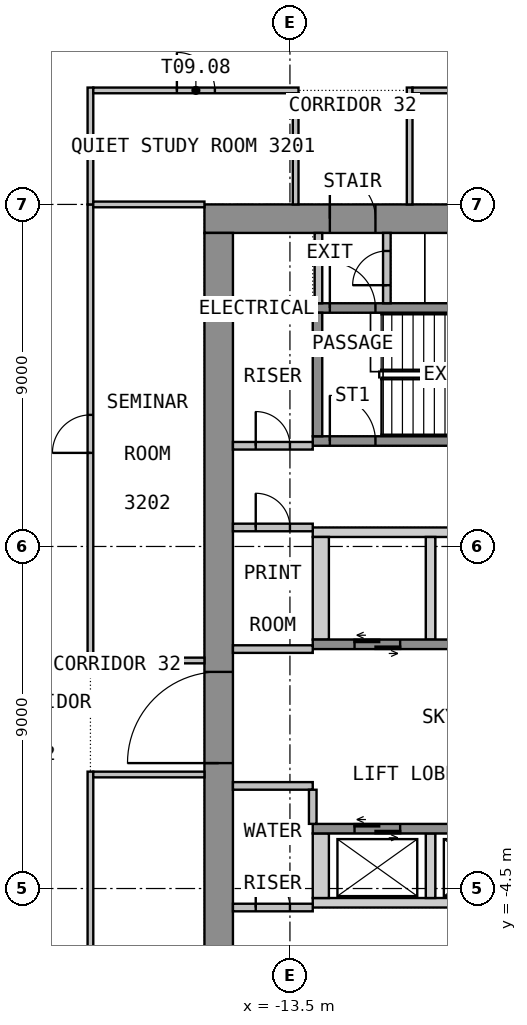
"""IFC4 building model, lengths in metres.
Left out: names, types, materials, properties, quantities, classifications, styles, units other than length and angle.
Written with IfcOpenShell. Run it as: python <this file> out.ifc"""

import sys

from ifc_helpers import new_model, si_unit, direction, frame, frame_2d, origin, place, context, subcontext, project, spatial, polyline, rectangle, outline, extrude, element, fill, save


model = new_model("IFC4")
c1 = context("Model", 3, precision=1e-05, world=origin(), true_north=direction((0.0, 1.0)))
c2 = subcontext(c1, "Body", "Model", "MODEL_VIEW")
j1 = project(units=[si_unit("LENGTHUNIT", "METRE"), si_unit("PLANEANGLEUNIT", "RADIAN")], contexts=[c1])
p1 = place(None, origin())
s1 = spatial("IfcSite", under=j1, at=p1, CompositionType="ELEMENT")
p2 = place(p1, origin())
s2 = spatial("IfcBuilding", under=s1, at=p2, CompositionType="ELEMENT")
p3 = place(p2, frame((0.0, 0.0, 132.6)))
s3 = spatial("IfcBuildingStorey", under=s2, at=p3, CompositionType="ELEMENT", Elevation=132.6)
p4 = place(p3, frame((-15.75, 13.125, 0.0), z_axis=(0.0, 0.0, 1.0), x_axis=(1.0, 0.0, 0.0)))
e1 = element("IfcWall", 1, at=p4, inside=s3, PredefinedType="SHEAR", context=c2, shape_type="SweptSolid", body=[
    extrude(rectangle(XDim=31.5, YDim=0.75, at=frame_2d((15.75, 0.0))), origin(), (0.0, 0.0, 1.0), 3.575),
])
p5 = place(p4, frame((14.55, 0.0, 0.0)))
e2 = element("IfcOpeningElement", 2, at=p5, cuts=e1, PredefinedType="OPENING", context=c2, shape_type="SweptSolid", body=[
    extrude(rectangle(XDim=2.4, YDim=2.1, at=frame_2d((1.2, 1.05))), frame((0.0, 0.385, 0.0), z_axis=(0.0, -1.0, 0.0), x_axis=(1.0, 0.0, 0.0)), (0.0, 0.0, 1.0), 0.77),
])
p6 = place(p4, frame((3.3, 0.0, 0.0)))
e3 = element("IfcOpeningElement", 3, at=p6, cuts=e1, PredefinedType="OPENING", context=c2, shape_type="SweptSolid", body=[
    extrude(rectangle(XDim=1.2, YDim=2.1, at=frame_2d((0.6, 1.05))), frame((0.0, 0.385, 0.0), z_axis=(0.0, -1.0, 0.0), x_axis=(1.0, 0.0, 0.0)), (0.0, 0.0, 1.0), 0.77),
])
p7 = place(p4, frame((27.0, 0.0, 0.0)))
e4 = element("IfcOpeningElement", 4, at=p7, cuts=e1, PredefinedType="OPENING", context=c2, shape_type="SweptSolid", body=[
    extrude(rectangle(XDim=1.2, YDim=2.1, at=frame_2d((0.6, 1.05))), frame((0.0, 0.385, 0.0), z_axis=(0.0, -1.0, 0.0), x_axis=(1.0, 0.0, 0.0)), (0.0, 0.0, 1.0), 0.77),
])
p8 = place(p3, frame((-15.375, -12.75, 0.0), z_axis=(0.0, 0.0, 1.0), x_axis=(0.0, 1.0, 0.0)))
e5 = element("IfcWall", 5, at=p8, inside=s3, PredefinedType="SHEAR", context=c2, shape_type="SweptSolid", body=[
    extrude(rectangle(XDim=25.5, YDim=0.75, at=frame_2d((12.75, 0.0))), origin(), (0.0, 0.0, 1.0), 3.575),
])
p9 = place(p8, frame((11.55, 0.0, 0.0)))
e6 = element("IfcOpeningElement", 6, at=p9, cuts=e5, PredefinedType="OPENING", context=c2, shape_type="SweptSolid", body=[
    extrude(rectangle(XDim=2.4, YDim=2.1, at=frame_2d((1.2, 1.05))), frame((0.0, 0.385, 0.0), z_axis=(0.0, -1.0, 0.0), x_axis=(1.0, 0.0, 0.0)), (0.0, 0.0, 1.0), 0.77),
])
p10 = place(p3, origin())
e7 = element("IfcWall", 7, at=p10, inside=s3, PredefinedType="SHEAR", context=c2, shape_type="SweptSolid", body=[
    extrude(outline(polyline([(-12.9, 4.75), (-4.075, 4.75), (-4.075, 5.0), (-12.9, 5.0), (-12.9, 4.75)])), origin(), (0.0, 0.0, 1.0), 3.575),
])
p11 = place(p3, origin())
e8 = element("IfcWall", 8, at=p11, inside=s3, PredefinedType="SHEAR", context=c2, shape_type="SweptSolid", body=[
    extrude(outline(polyline([(-12.9, 2.05), (-12.475, 2.05), (-12.475, 4.75), (-12.9, 4.75), (-12.9, 2.05)])), origin(), (0.0, 0.0, 1.0), 3.575),
])
p12 = place(p3, origin())
e9 = element("IfcWall", 9, at=p12, inside=s3, PredefinedType="SHEAR", context=c2, shape_type="SweptSolid", body=[
    extrude(outline(polyline([(-9.925, 2.05), (-9.675, 2.05), (-9.675, 4.75), (-9.925, 4.75), (-9.925, 2.05)])), origin(), (0.0, 0.0, 1.0), 3.575),
])
p13 = place(p3, frame((-12.9, 1.925, 0.0), z_axis=(0.0, 0.0, 1.0), x_axis=(1.0, 0.0, 0.0)))
e10 = element("IfcWall", 10, at=p13, inside=s3, PredefinedType="SHEAR", context=c2, shape_type="SweptSolid", body=[
    extrude(rectangle(XDim=8.825, YDim=0.25, at=frame_2d((4.413, 0.0))), origin(), (0.0, 0.0, 1.0), 3.575),
])
p14 = place(p13, frame((1.1, 0.0, 0.0)))
e11 = element("IfcOpeningElement", 11, at=p14, cuts=e10, PredefinedType="OPENING", context=c2, shape_type="SweptSolid", body=[
    extrude(rectangle(XDim=1.2, YDim=2.1, at=frame_2d((0.6, 1.05))), frame((0.0, 0.135, 0.0), z_axis=(0.0, -1.0, 0.0), x_axis=(1.0, 0.0, 0.0)), (0.0, 0.0, 1.0), 0.27),
])
p15 = place(p13, frame((3.9, 0.0, 0.0)))
e12 = element("IfcOpeningElement", 12, at=p15, cuts=e10, PredefinedType="OPENING", context=c2, shape_type="SweptSolid", body=[
    extrude(rectangle(XDim=1.2, YDim=2.1, at=frame_2d((0.6, 1.05))), frame((0.0, 0.135, 0.0), z_axis=(0.0, -1.0, 0.0), x_axis=(1.0, 0.0, 0.0)), (0.0, 0.0, 1.0), 0.27),
])
p16 = place(p13, frame((6.7, 0.0, 0.0)))
e13 = element("IfcOpeningElement", 13, at=p16, cuts=e10, PredefinedType="OPENING", context=c2, shape_type="SweptSolid", body=[
    extrude(rectangle(XDim=1.2, YDim=2.1, at=frame_2d((0.6, 1.05))), frame((0.0, 0.135, 0.0), z_axis=(0.0, -1.0, 0.0), x_axis=(1.0, 0.0, 0.0)), (0.0, 0.0, 1.0), 0.27),
])
p17 = place(p3, origin())
e14 = element("IfcWall", 14, at=p17, inside=s3, PredefinedType="SHEAR", context=c2, shape_type="SweptSolid", body=[
    extrude(outline(polyline([(-12.9, -5.0), (-4.075, -5.0), (-4.075, -4.75), (-12.9, -4.75), (-12.9, -5.0)])), origin(), (0.0, 0.0, 1.0), 3.575),
])
p18 = place(p3, origin())
e15 = element("IfcWall", 15, at=p18, inside=s3, PredefinedType="SHEAR", context=c2, shape_type="SweptSolid", body=[
    extrude(outline(polyline([(-12.9, -4.75), (-12.475, -4.75), (-12.475, -3.05), (-12.9, -3.05), (-12.9, -4.75)])), origin(), (0.0, 0.0, 1.0), 3.575),
])
p19 = place(p3, origin())
e16 = element("IfcWall", 16, at=p19, inside=s3, PredefinedType="SHEAR", context=c2, shape_type="SweptSolid", body=[
    extrude(outline(polyline([(-9.925, -4.75), (-9.675, -4.75), (-9.675, -3.05), (-9.925, -3.05), (-9.925, -4.75)])), origin(), (0.0, 0.0, 1.0), 3.575),
])
p20 = place(p3, frame((-12.9, -2.925, 0.0), z_axis=(0.0, 0.0, 1.0), x_axis=(1.0, 0.0, 0.0)))
e17 = element("IfcWall", 17, at=p20, inside=s3, PredefinedType="SHEAR", context=c2, shape_type="SweptSolid", body=[
    extrude(rectangle(XDim=8.825, YDim=0.25, at=frame_2d((4.413, 0.0))), origin(), (0.0, 0.0, 1.0), 3.575),
])
p21 = place(p20, frame((1.1, 0.0, 0.0)))
e18 = element("IfcOpeningElement", 18, at=p21, cuts=e17, PredefinedType="OPENING", context=c2, shape_type="SweptSolid", body=[
    extrude(rectangle(XDim=1.2, YDim=2.1, at=frame_2d((0.6, 1.05))), frame((0.0, 0.135, 0.0), z_axis=(0.0, -1.0, 0.0), x_axis=(1.0, 0.0, 0.0)), (0.0, 0.0, 1.0), 0.27),
])
p22 = place(p20, frame((3.9, 0.0, 0.0)))
e19 = element("IfcOpeningElement", 19, at=p22, cuts=e17, PredefinedType="OPENING", context=c2, shape_type="SweptSolid", body=[
    extrude(rectangle(XDim=1.2, YDim=2.1, at=frame_2d((0.6, 1.05))), frame((0.0, 0.135, 0.0), z_axis=(0.0, -1.0, 0.0), x_axis=(1.0, 0.0, 0.0)), (0.0, 0.0, 1.0), 0.27),
])
p23 = place(p20, frame((6.7, 0.0, 0.0)))
e20 = element("IfcOpeningElement", 20, at=p23, cuts=e17, PredefinedType="OPENING", context=c2, shape_type="SweptSolid", body=[
    extrude(rectangle(XDim=1.2, YDim=2.1, at=frame_2d((0.6, 1.05))), frame((0.0, 0.135, 0.0), z_axis=(0.0, -1.0, 0.0), x_axis=(1.0, 0.0, 0.0)), (0.0, 0.0, 1.0), 0.27),
])
p24 = place(p3, frame((-12.9, 7.275, 0.0), z_axis=(0.0, 0.0, 1.0), x_axis=(1.0, 0.0, 0.0)))
e21 = element("IfcWall", 21, at=p24, inside=s3, PredefinedType="SHEAR", context=c2, shape_type="SweptSolid", body=[
    extrude(rectangle(XDim=10.1, YDim=0.25, at=frame_2d((5.05, 0.0))), origin(), (0.0, 0.0, 1.0), 3.575),
])
p25 = place(p24, frame((0.45, 0.0, 0.0)))
e22 = element("IfcOpeningElement", 22, at=p25, cuts=e21, PredefinedType="OPENING", context=c2, shape_type="SweptSolid", body=[
    extrude(rectangle(XDim=1.2, YDim=2.1, at=frame_2d((0.6, 1.05))), frame((0.0, 0.135, 0.0), z_axis=(0.0, -1.0, 0.0), x_axis=(1.0, 0.0, 0.0)), (0.0, 0.0, 1.0), 0.27),
])
p26 = place(p3, frame((-12.9, 10.775, 0.0), z_axis=(0.0, 0.0, 1.0), x_axis=(1.0, 0.0, 0.0)))
e23 = element("IfcWall", 23, at=p26, inside=s3, PredefinedType="SHEAR", context=c2, shape_type="SweptSolid", body=[
    extrude(rectangle(XDim=10.1, YDim=0.25, at=frame_2d((5.05, 0.0))), origin(), (0.0, 0.0, 1.0), 3.575),
])
p27 = place(p26, frame((0.45, 0.0, 0.0)))
e24 = element("IfcOpeningElement", 24, at=p27, cuts=e23, PredefinedType="OPENING", context=c2, shape_type="SweptSolid", body=[
    extrude(rectangle(XDim=1.2, YDim=2.1, at=frame_2d((0.6, 1.05))), frame((0.0, 0.135, 0.0), z_axis=(0.0, -1.0, 0.0), x_axis=(1.0, 0.0, 0.0)), (0.0, 0.0, 1.0), 0.27),
])
p28 = place(p3, frame((-12.775, 7.4, 0.0), z_axis=(0.0, 0.0, 1.0), x_axis=(0.0, 1.0, 0.0)))
e25 = element("IfcWall", 25, at=p28, inside=s3, PredefinedType="SHEAR", context=c2, shape_type="SweptSolid", body=[
    extrude(rectangle(XDim=3.25, YDim=0.25, at=frame_2d((1.625, 0.0))), origin(), (0.0, 0.0, 1.0), 3.575),
])
p29 = place(p3, frame((-12.75, 10.9, 0.0), z_axis=(0.0, 0.0, 1.0), x_axis=(0.0, 1.0, 0.0)))
e26 = element("IfcWall", 26, at=p29, inside=s3, PredefinedType="PARTITIONING", context=c2, shape_type="SweptSolid", body=[
    extrude(rectangle(XDim=1.85, YDim=0.2, at=frame_2d((0.925, 0.0))), origin(), (0.0, 0.0, 1.0), 3.575),
])
p30 = place(p3, frame((-10.95, 10.9, 0.0), z_axis=(0.0, 0.0, 1.0), x_axis=(0.0, 1.0, 0.0)))
e27 = element("IfcWall", 27, at=p30, inside=s3, PredefinedType="PARTITIONING", context=c2, shape_type="SweptSolid", body=[
    extrude(rectangle(XDim=1.85, YDim=0.2, at=frame_2d((0.925, 0.0))), origin(), (0.0, 0.0, 1.0), 3.575),
])
p31 = place(p30, frame((0.475, 0.0, 0.0)))
e28 = element("IfcOpeningElement", 28, at=p31, cuts=e27, PredefinedType="OPENING", context=c2, shape_type="SweptSolid", body=[
    extrude(rectangle(XDim=0.9, YDim=2.1, at=frame_2d((0.45, 1.05))), frame((0.0, 0.11, 0.0), z_axis=(0.0, -1.0, 0.0), x_axis=(1.0, 0.0, 0.0)), (0.0, 0.0, 1.0), 0.22),
])
p32 = place(p3, frame((-15.0, 7.15, 0.0), z_axis=(0.0, 0.0, 1.0), x_axis=(1.0, 0.0, 0.0)))
e29 = element("IfcWall", 29, at=p32, inside=s3, PredefinedType="PARTITIONING", context=c2, shape_type="SweptSolid", body=[
    extrude(rectangle(XDim=2.1, YDim=0.2, at=frame_2d((1.05, 0.0))), origin(), (0.0, 0.0, 1.0), 3.575),
])
p33 = place(p32, frame((0.6, 0.0, 0.0)))
e30 = element("IfcOpeningElement", 30, at=p33, cuts=e29, PredefinedType="OPENING", context=c2, shape_type="SweptSolid", body=[
    extrude(rectangle(XDim=0.9, YDim=2.1, at=frame_2d((0.45, 1.05))), frame((0.0, 0.11, 0.0), z_axis=(0.0, -1.0, 0.0), x_axis=(1.0, 0.0, 0.0)), (0.0, 0.0, 1.0), 0.22),
])
p34 = place(p3, frame((-15.0, 5.0, 0.0), z_axis=(0.0, 0.0, 1.0), x_axis=(1.0, 0.0, 0.0)))
e31 = element("IfcWall", 31, at=p34, inside=s3, PredefinedType="PARTITIONING", context=c2, shape_type="SweptSolid", body=[
    extrude(rectangle(XDim=2.1, YDim=0.2, at=frame_2d((1.05, 0.0))), origin(), (0.0, 0.0, 1.0), 3.575),
])
p35 = place(p34, frame((0.6, 0.0, 0.0)))
e32 = element("IfcOpeningElement", 32, at=p35, cuts=e31, PredefinedType="OPENING", context=c2, shape_type="SweptSolid", body=[
    extrude(rectangle(XDim=0.9, YDim=2.1, at=frame_2d((0.45, 1.05))), frame((0.0, 0.11, 0.0), z_axis=(0.0, -1.0, 0.0), x_axis=(1.0, 0.0, 0.0)), (0.0, 0.0, 1.0), 0.22),
])
p36 = place(p3, frame((-15.0, 1.8, 0.0), z_axis=(0.0, 0.0, 1.0), x_axis=(1.0, 0.0, 0.0)))
e33 = element("IfcWall", 33, at=p36, inside=s3, PredefinedType="PARTITIONING", context=c2, shape_type="SweptSolid", body=[
    extrude(rectangle(XDim=2.1, YDim=0.2, at=frame_2d((1.05, 0.0))), origin(), (0.0, 0.0, 1.0), 3.575),
])
p37 = place(p3, frame((-15.0, -5.0, 0.0), z_axis=(0.0, 0.0, 1.0), x_axis=(1.0, 0.0, 0.0)))
e34 = element("IfcWall", 34, at=p37, inside=s3, PredefinedType="PARTITIONING", context=c2, shape_type="SweptSolid", body=[
    extrude(rectangle(XDim=2.1, YDim=0.2, at=frame_2d((1.05, 0.0))), origin(), (0.0, 0.0, 1.0), 3.575),
])
p38 = place(p37, frame((0.6, 0.0, 0.0)))
e35 = element("IfcOpeningElement", 35, at=p38, cuts=e34, PredefinedType="OPENING", context=c2, shape_type="SweptSolid", body=[
    extrude(rectangle(XDim=0.9, YDim=2.1, at=frame_2d((0.45, 1.05))), frame((0.0, 0.11, 0.0), z_axis=(0.0, -1.0, 0.0), x_axis=(1.0, 0.0, 0.0)), (0.0, 0.0, 1.0), 0.22),
])
p39 = place(p3, frame((-15.0, -1.8, 0.0), z_axis=(0.0, 0.0, 1.0), x_axis=(1.0, 0.0, 0.0)))
e36 = element("IfcWall", 36, at=p39, inside=s3, PredefinedType="PARTITIONING", context=c2, shape_type="SweptSolid", body=[
    extrude(rectangle(XDim=2.1, YDim=0.2, at=frame_2d((1.05, 0.0))), origin(), (0.0, 0.0, 1.0), 3.575),
])
p40 = place(p3, frame((-18.75, -13.5, 0.0), z_axis=(0.0, 0.0, 1.0), x_axis=(0.0, 1.0, 0.0)))
e37 = element("IfcWall", 37, at=p40, inside=s3, PredefinedType="PARTITIONING", context=c2, shape_type="SweptSolid", body=[
    extrude(rectangle(XDim=12.075, YDim=0.15, at=frame_2d((6.038, 0.0))), origin(), (0.0, 0.0, 1.0), 3.575),
])
p41 = place(p40, frame((5.538, 0.0, 0.0)))
e38 = element("IfcOpeningElement", 38, at=p41, cuts=e37, PredefinedType="OPENING", context=c2, shape_type="SweptSolid", body=[
    extrude(rectangle(XDim=1.0, YDim=2.1, at=frame_2d((0.5, 1.05))), frame((0.0, 0.085, 0.0), z_axis=(0.0, -1.0, 0.0), x_axis=(1.0, 0.0, 0.0)), (0.0, 0.0, 1.0), 0.17),
])
p42 = place(p3, frame((-18.675, -1.5, 0.0), z_axis=(0.0, 0.0, 1.0), x_axis=(1.0, 0.0, 0.0)))
e39 = element("IfcWall", 39, at=p42, inside=s3, PredefinedType="PARTITIONING", context=c2, shape_type="SweptSolid", body=[
    extrude(rectangle(XDim=2.925, YDim=0.15, at=frame_2d((1.462, 0.0))), origin(), (0.0, 0.0, 1.0), 3.575),
])
p43 = place(p3, frame((-18.75, 1.425, 0.0), z_axis=(0.0, 0.0, 1.0), x_axis=(0.0, 1.0, 0.0)))
e40 = element("IfcWall", 40, at=p43, inside=s3, PredefinedType="PARTITIONING", context=c2, shape_type="SweptSolid", body=[
    extrude(rectangle(XDim=12.075, YDim=0.15, at=frame_2d((6.038, 0.0))), origin(), (0.0, 0.0, 1.0), 3.575),
])
p44 = place(p43, frame((5.538, 0.0, 0.0)))
e41 = element("IfcOpeningElement", 41, at=p44, cuts=e40, PredefinedType="OPENING", context=c2, shape_type="SweptSolid", body=[
    extrude(rectangle(XDim=1.0, YDim=2.1, at=frame_2d((0.5, 1.05))), frame((0.0, 0.085, 0.0), z_axis=(0.0, -1.0, 0.0), x_axis=(1.0, 0.0, 0.0)), (0.0, 0.0, 1.0), 0.17),
])
p45 = place(p3, frame((-15.75, 1.5, 0.0), z_axis=(0.0, 0.0, 1.0), x_axis=(-1.0, 0.0, 0.0)))
e42 = element("IfcWall", 42, at=p45, inside=s3, PredefinedType="PARTITIONING", context=c2, shape_type="SweptSolid", body=[
    extrude(rectangle(XDim=2.925, YDim=0.15, at=frame_2d((1.462, 0.0))), origin(), (0.0, 0.0, 1.0), 3.575),
])
p46 = place(p3, frame((-18.75, 13.5, 0.0), z_axis=(0.0, 0.0, 1.0), x_axis=(0.0, 1.0, 0.0)))
e43 = element("IfcWall", 43, at=p46, inside=s3, PredefinedType="PARTITIONING", context=c2, shape_type="SweptSolid", body=[
    extrude(rectangle(XDim=3.075, YDim=0.15, at=frame_2d((1.538, 0.0))), origin(), (0.0, 0.0, 1.0), 3.575),
])
p47 = place(p3, frame((-18.675, 13.5, 0.0), z_axis=(0.0, 0.0, 1.0), x_axis=(1.0, 0.0, 0.0)))
e44 = element("IfcWall", 44, at=p47, inside=s3, PredefinedType="PARTITIONING", context=c2, shape_type="SweptSolid", body=[
    extrude(rectangle(XDim=2.925, YDim=0.15, at=frame_2d((1.462, 0.0))), origin(), (0.0, 0.0, 1.0), 3.575),
])
p48 = place(p3, frame((-18.675, 16.5, 0.0), z_axis=(0.0, 0.0, 1.0), x_axis=(1.0, 0.0, 0.0)))
e45 = element("IfcWall", 45, at=p48, inside=s3, PredefinedType="PARTITIONING", context=c2, shape_type="SweptSolid", body=[
    extrude(rectangle(XDim=5.4, YDim=0.15, at=frame_2d((2.7, 0.0))), origin(), (0.0, 0.0, 1.0), 3.575),
])
p49 = place(p48, frame((2.2, 0.0, 0.0)))
e46 = element("IfcOpeningElement", 46, at=p49, cuts=e45, PredefinedType="OPENING", context=c2, shape_type="SweptSolid", body=[
    extrude(rectangle(XDim=1.0, YDim=2.1, at=frame_2d((0.5, 1.05))), frame((0.0, 0.085, 0.0), z_axis=(0.0, -1.0, 0.0), x_axis=(1.0, 0.0, 0.0)), (0.0, 0.0, 1.0), 0.17),
])
p50 = place(p3, frame((-13.35, 16.425, 0.0), z_axis=(0.0, 0.0, 1.0), x_axis=(0.0, -1.0, 0.0)))
e47 = element("IfcWall", 47, at=p50, inside=s3, PredefinedType="PARTITIONING", context=c2, shape_type="SweptSolid", body=[
    extrude(rectangle(XDim=2.925, YDim=0.15, at=frame_2d((1.462, 0.0))), origin(), (0.0, 0.0, 1.0), 3.575),
])
p51 = place(p3, frame((-10.35, 13.5, 0.0), z_axis=(0.0, 0.0, 1.0), x_axis=(0.0, 1.0, 0.0)))
e48 = element("IfcWall", 48, at=p51, inside=s3, PredefinedType="PARTITIONING", context=c2, shape_type="SweptSolid", body=[
    extrude(rectangle(XDim=3.075, YDim=0.15, at=frame_2d((1.538, 0.0))), origin(), (0.0, 0.0, 1.0), 3.575),
])
p52 = place(p3, frame((-10.275, 16.5, 0.0), z_axis=(0.0, 0.0, 1.0), x_axis=(1.0, 0.0, 0.0)))
e49 = element("IfcWall", 49, at=p52, inside=s3, PredefinedType="PARTITIONING", context=c2, shape_type="SweptSolid", body=[
    extrude(rectangle(XDim=8.85, YDim=0.15, at=frame_2d((4.425, 0.0))), origin(), (0.0, 0.0, 1.0), 3.575),
])
p53 = place(p52, frame((3.925, 0.0, 0.0)))
e50 = element("IfcOpeningElement", 50, at=p53, cuts=e49, PredefinedType="OPENING", context=c2, shape_type="SweptSolid", body=[
    extrude(rectangle(XDim=1.0, YDim=2.1, at=frame_2d((0.5, 1.05))), frame((0.0, 0.085, 0.0), z_axis=(0.0, -1.0, 0.0), x_axis=(1.0, 0.0, 0.0)), (0.0, 0.0, 1.0), 0.17),
])
p54 = place(p3, frame((-12.9, -2.799, 0.0), z_axis=(0.0, 0.0, 1.0), x_axis=(0.0, 1.0, 0.0)))
e51 = element("IfcWall", 51, at=p54, inside=s3, PredefinedType="PARTITIONING", context=c2, shape_type="SweptSolid", body=[
    extrude(rectangle(XDim=0.898, YDim=0.2, at=frame_2d((0.449, 0.0))), origin(), (0.0, 0.0, 1.0), 3.575),
])
p55 = place(p9, origin())
e52 = element("IfcDoor", 52, at=p55, inside=s3, OperationType="DOUBLE_DOOR_DOUBLE_SWING", PredefinedType="DOOR", context=c2, shape_type="SweptSolid", body=[
    extrude(rectangle(XDim=2.4, YDim=2.1, at=frame_2d((1.2, 1.05))), frame((0.0, 0.025, 0.0), z_axis=(0.0, -1.0, 0.0), x_axis=(1.0, 0.0, 0.0)), (0.0, 0.0, 1.0), 0.05),
])
fill(e6, e52)
p56 = place(p6, origin())
e53 = element("IfcDoor", 53, at=p56, inside=s3, OperationType="SINGLE_SWING_RIGHT", PredefinedType="DOOR", context=c2, shape_type="SweptSolid", body=[
    extrude(rectangle(XDim=1.2, YDim=2.1, at=frame_2d((0.6, 1.05))), frame((0.0, 0.025, 0.0), z_axis=(0.0, -1.0, 0.0), x_axis=(1.0, 0.0, 0.0)), (0.0, 0.0, 1.0), 0.05),
])
fill(e3, e53)
p57 = place(p14, origin())
e54 = element("IfcDoor", 54, at=p57, inside=s3, OperationType="DOUBLE_DOOR_SLIDING", PredefinedType="DOOR", context=c2, shape_type="SweptSolid", body=[
    extrude(rectangle(XDim=1.2, YDim=2.1, at=frame_2d((0.6, 1.05))), frame((0.0, 0.025, 0.0), z_axis=(0.0, -1.0, 0.0), x_axis=(1.0, 0.0, 0.0)), (0.0, 0.0, 1.0), 0.05),
])
fill(e11, e54)
p58 = place(p21, origin())
e55 = element("IfcDoor", 55, at=p58, inside=s3, OperationType="DOUBLE_DOOR_SLIDING", PredefinedType="DOOR", context=c2, shape_type="SweptSolid", body=[
    extrude(rectangle(XDim=1.2, YDim=2.1, at=frame_2d((0.6, 1.05))), frame((0.0, 0.025, 0.0), z_axis=(0.0, -1.0, 0.0), x_axis=(1.0, 0.0, 0.0)), (0.0, 0.0, 1.0), 0.05),
])
fill(e18, e55)
p59 = place(p25, origin())
e56 = element("IfcDoor", 56, at=p59, inside=s3, OperationType="SINGLE_SWING_LEFT", PredefinedType="DOOR", context=c2, shape_type="SweptSolid", body=[
    extrude(rectangle(XDim=1.2, YDim=2.1, at=frame_2d((0.6, 1.05))), frame((0.0, 0.025, 0.0), z_axis=(0.0, -1.0, 0.0), x_axis=(1.0, 0.0, 0.0)), (0.0, 0.0, 1.0), 0.05),
])
fill(e22, e56)
p60 = place(p27, origin())
e57 = element("IfcDoor", 57, at=p60, inside=s3, OperationType="SINGLE_SWING_RIGHT", PredefinedType="DOOR", context=c2, shape_type="SweptSolid", body=[
    extrude(rectangle(XDim=1.2, YDim=2.1, at=frame_2d((0.6, 1.05))), frame((0.0, 0.025, 0.0), z_axis=(0.0, -1.0, 0.0), x_axis=(1.0, 0.0, 0.0)), (0.0, 0.0, 1.0), 0.05),
])
fill(e24, e57)
p61 = place(p31, origin())
e58 = element("IfcDoor", 58, at=p61, inside=s3, OperationType="SINGLE_SWING_LEFT", PredefinedType="DOOR", context=c2, shape_type="SweptSolid", body=[
    extrude(rectangle(XDim=0.9, YDim=2.1, at=frame_2d((0.45, 1.05))), frame((0.0, 0.025, 0.0), z_axis=(0.0, -1.0, 0.0), x_axis=(1.0, 0.0, 0.0)), (0.0, 0.0, 1.0), 0.05),
])
fill(e28, e58)
p62 = place(p33, origin())
e59 = element("IfcDoor", 59, at=p62, inside=s3, OperationType="SINGLE_SWING_LEFT", PredefinedType="DOOR", context=c2, shape_type="SweptSolid", body=[
    extrude(rectangle(XDim=0.9, YDim=2.1, at=frame_2d((0.45, 1.05))), frame((0.0, 0.025, 0.0), z_axis=(0.0, -1.0, 0.0), x_axis=(1.0, 0.0, 0.0)), (0.0, 0.0, 1.0), 0.05),
])
fill(e30, e59)
p63 = place(p35, origin())
e60 = element("IfcDoor", 60, at=p63, inside=s3, OperationType="SINGLE_SWING_LEFT", PredefinedType="DOOR", context=c2, shape_type="SweptSolid", body=[
    extrude(rectangle(XDim=0.9, YDim=2.1, at=frame_2d((0.45, 1.05))), frame((0.0, 0.025, 0.0), z_axis=(0.0, -1.0, 0.0), x_axis=(1.0, 0.0, 0.0)), (0.0, 0.0, 1.0), 0.05),
])
fill(e32, e60)
p64 = place(p38, origin())
e61 = element("IfcDoor", 61, at=p64, inside=s3, OperationType="SINGLE_SWING_LEFT", PredefinedType="DOOR", context=c2, shape_type="SweptSolid", body=[
    extrude(rectangle(XDim=0.9, YDim=2.1, at=frame_2d((0.45, 1.05))), frame((0.0, 0.025, 0.0), z_axis=(0.0, -1.0, 0.0), x_axis=(1.0, 0.0, 0.0)), (0.0, 0.0, 1.0), 0.05),
])
fill(e35, e61)
p65 = place(p44, origin())
e62 = element("IfcDoor", 62, at=p65, inside=s3, OperationType="SINGLE_SWING_LEFT", PredefinedType="DOOR", context=c2, shape_type="SweptSolid", body=[
    extrude(rectangle(XDim=1.0, YDim=2.1, at=frame_2d((0.5, 1.05))), frame((0.0, 0.025, 0.0), z_axis=(0.0, -1.0, 0.0), x_axis=(1.0, 0.0, 0.0)), (0.0, 0.0, 1.0), 0.05),
])
fill(e41, e62)
p66 = place(p49, origin())
e63 = element("IfcDoor", 63, at=p66, inside=s3, OperationType="SINGLE_SWING_LEFT", PredefinedType="DOOR", context=c2, shape_type="SweptSolid", body=[
    extrude(rectangle(XDim=1.0, YDim=2.1, at=frame_2d((0.5, 1.05))), frame((0.0, 0.025, 0.0), z_axis=(0.0, -1.0, 0.0), x_axis=(1.0, 0.0, 0.0)), (0.0, 0.0, 1.0), 0.05),
])
fill(e46, e63)
save(model, sys.argv[1])
